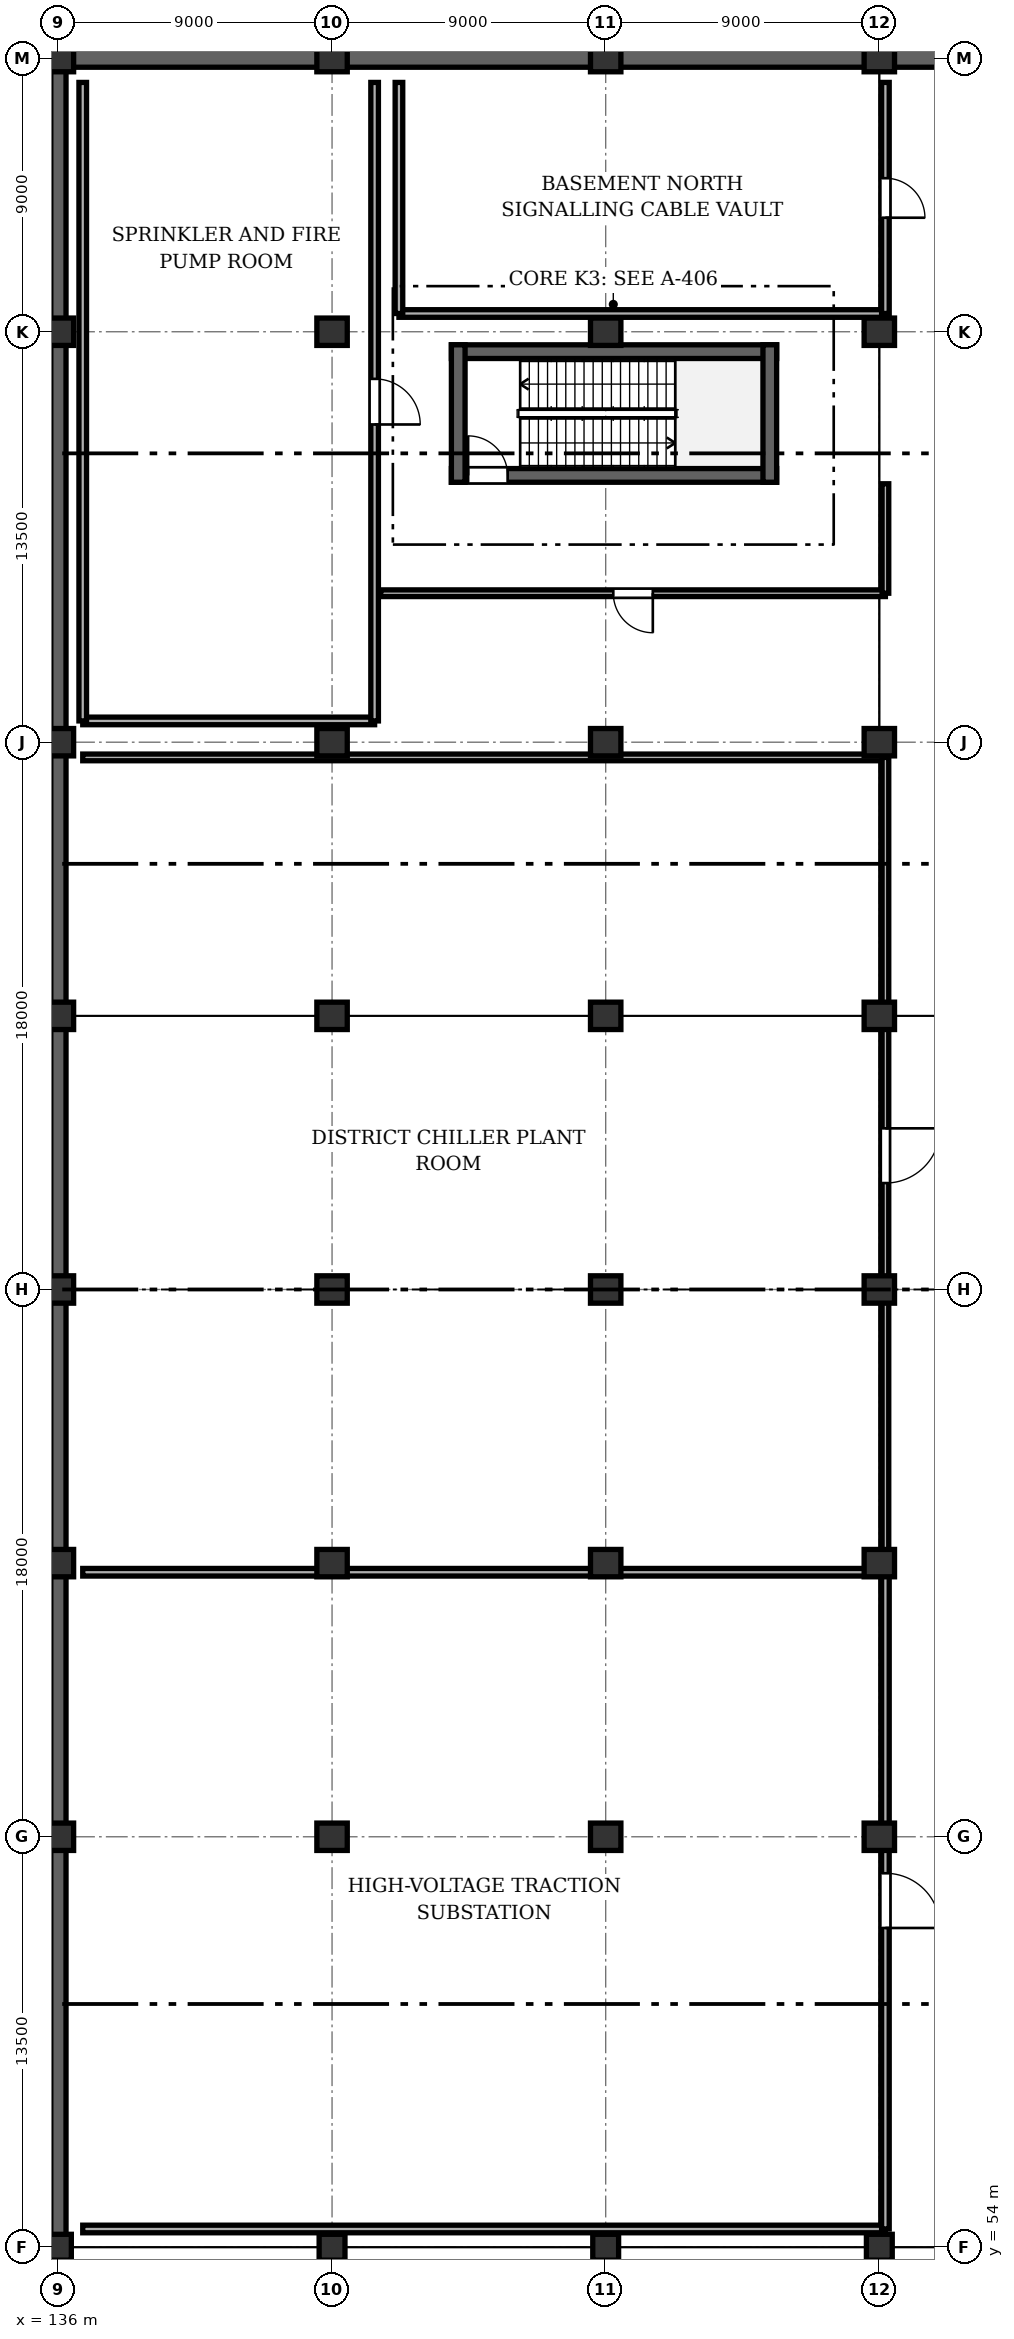
"""IFC4 building model, lengths in metres.
Left out: names, types, materials, properties, quantities, classifications, styles, units other than length and angle.
Written with IfcOpenShell. Run it as: python <this file> out.ifc"""

import sys

from ifc_helpers import new_model, si_unit, direction, frame, frame_2d, origin, origin_2d, place, context, subcontext, project, spatial, rectangle, extrude, element, fill, save


model = new_model("IFC4")
c1 = context("Model", 3, precision=1e-05, world=origin(), true_north=direction((0.0, 1.0)))
c2 = subcontext(c1, "Body", "Model", "MODEL_VIEW")
j1 = project(units=[si_unit("LENGTHUNIT", "METRE"), si_unit("PLANEANGLEUNIT", "RADIAN")], contexts=[c1])
p1 = place(None, origin())
s1 = spatial("IfcSite", under=j1, at=p1, CompositionType="ELEMENT")
p2 = place(p1, origin())
s2 = spatial("IfcBuilding", under=s1, at=p2, CompositionType="ELEMENT")
p3 = place(p2, frame((0.0, 0.0, -5.4)))
s3 = spatial("IfcBuildingStorey", under=s2, at=p3, CompositionType="ELEMENT", Elevation=-5.4)
p4 = place(p3, frame((136.0, 54.0, 0.0), z_axis=(0.0, 0.0, 1.0), x_axis=(1.0, 0.0, 0.0)))
e1 = element("IfcColumn", 1, at=p4, inside=s3, PredefinedType="COLUMN", context=c2, shape_type="SweptSolid", body=[
    extrude(rectangle(XDim=0.85, YDim=0.85, at=origin_2d()), origin(), (0.0, 0.0, 1.0), 5.4),
])
for number, where, z_axis, x_axis in (
    (2, (136.0, 67.5, 0.0), (0.0, 0.0, 1.0), (1.0, 0.0, 0.0)),
    (3, (136.0, 76.5, 0.0), (0.0, 0.0, 1.0), (1.0, 0.0, 0.0)),
    (4, (136.0, 85.5, 0.0), (0.0, 0.0, 1.0), (1.0, 0.0, 0.0)),
    (5, (136.0, 94.5, 0.0), (0.0, 0.0, 1.0), (1.0, 0.0, 0.0)),
    (6, (136.0, 103.5, 0.0), (0.0, 0.0, 1.0), (1.0, 0.0, 0.0)),
    (7, (136.0, 117.0, 0.0), (0.0, 0.0, 1.0), (1.0, 0.0, 0.0)),
    (8, (136.0, 126.0, 0.0), (0.0, 0.0, 1.0), (1.0, 0.0, 0.0)),
):
    element("IfcColumn", number, at=place(p3, frame(where, z_axis=z_axis, x_axis=x_axis)), inside=s3, PredefinedType="COLUMN", context=c2, shape_type="SweptSolid", body=[
        extrude(rectangle(XDim=1.0, YDim=0.9, at=origin_2d()), origin(), (0.0, 0.0, 1.0), 5.4),
    ])
p5 = place(p3, frame((145.0, 54.0, 0.0), z_axis=(0.0, 0.0, 1.0), x_axis=(1.0, 0.0, 0.0)))
e9 = element("IfcColumn", 9, at=p5, inside=s3, PredefinedType="COLUMN", context=c2, shape_type="SweptSolid", body=[
    extrude(rectangle(XDim=0.85, YDim=0.85, at=origin_2d()), origin(), (0.0, 0.0, 1.0), 5.4),
])
for number, where, z_axis, x_axis in (
    (10, (145.0, 67.5, 0.0), (0.0, 0.0, 1.0), (1.0, 0.0, 0.0)),
    (11, (145.0, 76.5, 0.0), (0.0, 0.0, 1.0), (1.0, 0.0, 0.0)),
    (12, (145.0, 85.5, 0.0), (0.0, 0.0, 1.0), (1.0, 0.0, 0.0)),
    (13, (145.0, 94.5, 0.0), (0.0, 0.0, 1.0), (1.0, 0.0, 0.0)),
    (14, (145.0, 103.5, 0.0), (0.0, 0.0, 1.0), (1.0, 0.0, 0.0)),
    (15, (145.0, 117.0, 0.0), (0.0, 0.0, 1.0), (1.0, 0.0, 0.0)),
    (16, (145.0, 126.0, 0.0), (0.0, 0.0, 1.0), (1.0, 0.0, 0.0)),
):
    element("IfcColumn", number, at=place(p3, frame(where, z_axis=z_axis, x_axis=x_axis)), inside=s3, PredefinedType="COLUMN", context=c2, shape_type="SweptSolid", body=[
        extrude(rectangle(XDim=1.0, YDim=0.9, at=origin_2d()), origin(), (0.0, 0.0, 1.0), 5.4),
    ])
p6 = place(p3, frame((154.0, 54.0, 0.0), z_axis=(0.0, 0.0, 1.0), x_axis=(1.0, 0.0, 0.0)))
e17 = element("IfcColumn", 17, at=p6, inside=s3, PredefinedType="COLUMN", context=c2, shape_type="SweptSolid", body=[
    extrude(rectangle(XDim=0.85, YDim=0.85, at=origin_2d()), origin(), (0.0, 0.0, 1.0), 5.4),
])
for number, where, z_axis, x_axis in (
    (18, (154.0, 67.5, 0.0), (0.0, 0.0, 1.0), (1.0, 0.0, 0.0)),
    (19, (154.0, 76.5, 0.0), (0.0, 0.0, 1.0), (1.0, 0.0, 0.0)),
    (20, (154.0, 85.5, 0.0), (0.0, 0.0, 1.0), (1.0, 0.0, 0.0)),
    (21, (154.0, 94.5, 0.0), (0.0, 0.0, 1.0), (1.0, 0.0, 0.0)),
    (22, (154.0, 103.5, 0.0), (0.0, 0.0, 1.0), (1.0, 0.0, 0.0)),
    (23, (154.0, 117.0, 0.0), (0.0, 0.0, 1.0), (1.0, 0.0, 0.0)),
    (24, (154.0, 126.0, 0.0), (0.0, 0.0, 1.0), (1.0, 0.0, 0.0)),
):
    element("IfcColumn", number, at=place(p3, frame(where, z_axis=z_axis, x_axis=x_axis)), inside=s3, PredefinedType="COLUMN", context=c2, shape_type="SweptSolid", body=[
        extrude(rectangle(XDim=1.0, YDim=0.9, at=origin_2d()), origin(), (0.0, 0.0, 1.0), 5.4),
    ])
p7 = place(p3, frame((163.0, 54.0, 0.0), z_axis=(0.0, 0.0, 1.0), x_axis=(1.0, 0.0, 0.0)))
e25 = element("IfcColumn", 25, at=p7, inside=s3, PredefinedType="COLUMN", context=c2, shape_type="SweptSolid", body=[
    extrude(rectangle(XDim=0.85, YDim=0.85, at=origin_2d()), origin(), (0.0, 0.0, 1.0), 5.4),
])
for number, where, z_axis, x_axis in (
    (26, (163.0, 67.5, 0.0), (0.0, 0.0, 1.0), (1.0, 0.0, 0.0)),
    (27, (163.0, 76.5, 0.0), (0.0, 0.0, 1.0), (1.0, 0.0, 0.0)),
    (28, (163.0, 85.5, 0.0), (0.0, 0.0, 1.0), (1.0, 0.0, 0.0)),
    (29, (163.0, 94.5, 0.0), (0.0, 0.0, 1.0), (1.0, 0.0, 0.0)),
    (30, (163.0, 103.5, 0.0), (0.0, 0.0, 1.0), (1.0, 0.0, 0.0)),
    (31, (163.0, 117.0, 0.0), (0.0, 0.0, 1.0), (1.0, 0.0, 0.0)),
    (32, (163.0, 126.0, 0.0), (0.0, 0.0, 1.0), (1.0, 0.0, 0.0)),
):
    element("IfcColumn", number, at=place(p3, frame(where, z_axis=z_axis, x_axis=x_axis)), inside=s3, PredefinedType="COLUMN", context=c2, shape_type="SweptSolid", body=[
        extrude(rectangle(XDim=1.0, YDim=0.9, at=origin_2d()), origin(), (0.0, 0.0, 1.0), 5.4),
    ])
p8 = place(p3, frame((188.0, 126.0, 0.0), z_axis=(0.0, 0.0, 1.0), x_axis=(-1.0, 0.0, 0.0)))
e33 = element("IfcWall", 33, at=p8, inside=s3, PredefinedType="USERDEFINED", context=c2, shape_type="SweptSolid", body=[
    extrude(rectangle(XDim=52.0, YDim=0.6, at=frame_2d((26.0, 0.0))), origin(), (0.0, 0.0, 1.0), 5.1),
])
p9 = place(p3, frame((136.0, 126.0, 0.0), z_axis=(0.0, 0.0, 1.0), x_axis=(0.0, -1.0, 0.0)))
e34 = element("IfcWall", 34, at=p9, inside=s3, PredefinedType="USERDEFINED", context=c2, shape_type="SweptSolid", body=[
    extrude(rectangle(XDim=72.0, YDim=0.5, at=frame_2d((36.0, 0.0))), origin(), (0.0, 0.0, 1.0), 5.1),
])
p10 = place(p3, frame((90.0, 54.0, 0.0), z_axis=(0.0, 0.0, 1.0), x_axis=(1.0, 0.0, 0.0)))
e35 = element("IfcWall", 35, at=p10, inside=s3, PredefinedType="USERDEFINED", context=c2, shape_type="SweptSolid", body=[
    extrude(rectangle(XDim=46.0, YDim=0.5, at=frame_2d((23.0, 0.0))), origin(), (0.0, 0.0, 1.0), 5.05),
])
p11 = place(p3, frame((148.925, 112.275, 0.0), z_axis=(0.0, 0.0, 1.0), x_axis=(1.0, 0.0, 0.0)))
e36 = element("IfcWall", 36, at=p11, inside=s3, PredefinedType="SHEAR", context=c2, shape_type="SweptSolid", body=[
    extrude(rectangle(XDim=10.698, YDim=0.45, at=frame_2d((5.349, 0.0))), origin(), (0.0, 0.0, 1.0), 5.1),
])
p12 = place(p11, frame((0.55, 0.0, 0.0)))
e37 = element("IfcOpeningElement", 37, at=p12, cuts=e36, PredefinedType="OPENING", context=c2, shape_type="SweptSolid", body=[
    extrude(rectangle(XDim=1.3, YDim=2.1, at=frame_2d((0.65, 1.05))), frame((0.0, 0.235, 0.0), z_axis=(0.0, -1.0, 0.0), x_axis=(1.0, 0.0, 0.0)), (0.0, 0.0, 1.0), 0.47),
])
p13 = place(p3, frame((159.623, 116.345, 0.0), z_axis=(0.0, 0.0, 1.0), x_axis=(-1.0, 0.0, 0.0)))
e38 = element("IfcWall", 38, at=p13, inside=s3, PredefinedType="SHEAR", context=c2, shape_type="SweptSolid", body=[
    extrude(rectangle(XDim=10.698, YDim=0.45, at=frame_2d((5.349, 0.0))), origin(), (0.0, 0.0, 1.0), 5.1),
])
for number, where, z_axis, x_axis in (
    (39, (159.397, 112.05, 0.0), (0.0, 0.0, 1.0), (0.0, 1.0, 0.0)),
    (40, (149.15, 116.57, 0.0), (0.0, 0.0, 1.0), (0.0, -1.0, 0.0)),
):
    element("IfcWall", number, at=place(p3, frame(where, z_axis=z_axis, x_axis=x_axis)), inside=s3, PredefinedType="SHEAR", context=c2, shape_type="SweptSolid", body=[
        extrude(rectangle(XDim=4.52, YDim=0.45, at=frame_2d((2.26, 0.0))), origin(), (0.0, 0.0, 1.0), 5.1),
    ])
for number, where, z_axis, x_axis in (
    (41, (163.2, 54.6, 0.0), (0.0, 0.0, 1.0), (-1.0, 0.0, 0.0)),
    (42, (136.8, 76.2, 0.0), (0.0, 0.0, 1.0), (1.0, 0.0, 0.0)),
):
    element("IfcWall", number, at=place(p3, frame(where, z_axis=z_axis, x_axis=x_axis)), inside=s3, PredefinedType="SOLIDWALL", context=c2, shape_type="SweptSolid", body=[
        extrude(rectangle(XDim=26.4, YDim=0.25, at=frame_2d((13.2, 0.0))), origin(), (0.0, 0.0, 1.0), 4.4),
    ])
p14 = place(p3, frame((163.2, 76.2, 0.0), z_axis=(0.0, 0.0, 1.0), x_axis=(0.0, -1.0, 0.0)))
e43 = element("IfcWall", 43, at=p14, inside=s3, PredefinedType="SOLIDWALL", context=c2, shape_type="SweptSolid", body=[
    extrude(rectangle(XDim=21.6, YDim=0.25, at=frame_2d((10.8, 0.0))), origin(), (0.0, 0.0, 1.0), 4.4),
])
p15 = place(p14, frame((9.9, 0.0, 0.0)))
e44 = element("IfcOpeningElement", 44, at=p15, cuts=e43, PredefinedType="OPENING", context=c2, shape_type="SweptSolid", body=[
    extrude(rectangle(XDim=1.8, YDim=2.2, at=frame_2d((0.9, 1.1))), frame((0.0, 0.135, 0.0), z_axis=(0.0, -1.0, 0.0), x_axis=(1.0, 0.0, 0.0)), (0.0, 0.0, 1.0), 0.27),
])
p16 = place(p3, frame((136.8, 103.0, 0.0), z_axis=(0.0, 0.0, 1.0), x_axis=(1.0, 0.0, 0.0)))
e45 = element("IfcWall", 45, at=p16, inside=s3, PredefinedType="SOLIDWALL", context=c2, shape_type="SweptSolid", body=[
    extrude(rectangle(XDim=26.4, YDim=0.22, at=frame_2d((13.2, 0.0))), origin(), (0.0, 0.0, 1.0), 4.4),
])
p17 = place(p3, frame((163.2, 103.0, 0.0), z_axis=(0.0, 0.0, 1.0), x_axis=(0.0, -1.0, 0.0)))
e46 = element("IfcWall", 46, at=p17, inside=s3, PredefinedType="SOLIDWALL", context=c2, shape_type="SweptSolid", body=[
    extrude(rectangle(XDim=26.2, YDim=0.22, at=frame_2d((13.1, 0.0))), origin(), (0.0, 0.0, 1.0), 4.4),
])
p18 = place(p17, frame((12.2, 0.0, 0.0)))
e47 = element("IfcOpeningElement", 47, at=p18, cuts=e46, PredefinedType="OPENING", context=c2, shape_type="SweptSolid", body=[
    extrude(rectangle(XDim=1.8, YDim=2.2, at=frame_2d((0.9, 1.1))), frame((0.0, 0.12, 0.0), z_axis=(0.0, -1.0, 0.0), x_axis=(1.0, 0.0, 0.0)), (0.0, 0.0, 1.0), 0.24),
])
p19 = place(p3, frame((146.4, 104.2, 0.0), z_axis=(0.0, 0.0, 1.0), x_axis=(-1.0, 0.0, 0.0)))
e48 = element("IfcWall", 48, at=p19, inside=s3, PredefinedType="SOLIDWALL", context=c2, shape_type="SweptSolid", body=[
    extrude(rectangle(XDim=9.6, YDim=0.25, at=frame_2d((4.8, 0.0))), origin(), (0.0, 0.0, 1.0), 4.4),
])
p20 = place(p3, frame((136.8, 104.2, 0.0), z_axis=(0.0, 0.0, 1.0), x_axis=(0.0, 1.0, 0.0)))
e49 = element("IfcWall", 49, at=p20, inside=s3, PredefinedType="SOLIDWALL", context=c2, shape_type="SweptSolid", body=[
    extrude(rectangle(XDim=21.0, YDim=0.25, at=frame_2d((10.5, 0.0))), origin(), (0.0, 0.0, 1.0), 4.4),
])
p21 = place(p3, frame((146.4, 125.2, 0.0), z_axis=(0.0, 0.0, 1.0), x_axis=(0.0, -1.0, 0.0)))
e50 = element("IfcWall", 50, at=p21, inside=s3, PredefinedType="SOLIDWALL", context=c2, shape_type="SweptSolid", body=[
    extrude(rectangle(XDim=21.0, YDim=0.25, at=frame_2d((10.5, 0.0))), origin(), (0.0, 0.0, 1.0), 4.4),
])
p22 = place(p21, frame((9.75, 0.0, 0.0)))
e51 = element("IfcOpeningElement", 51, at=p22, cuts=e50, PredefinedType="OPENING", context=c2, shape_type="SweptSolid", body=[
    extrude(rectangle(XDim=1.5, YDim=2.15, at=frame_2d((0.75, 1.075))), frame((0.0, 0.135, 0.0), z_axis=(0.0, -1.0, 0.0), x_axis=(1.0, 0.0, 0.0)), (0.0, 0.0, 1.0), 0.27),
])
p23 = place(p3, frame((163.2, 108.4, 0.0), z_axis=(0.0, 0.0, 1.0), x_axis=(-1.0, 0.0, 0.0)))
e52 = element("IfcWall", 52, at=p23, inside=s3, PredefinedType="SOLIDWALL", context=c2, shape_type="SweptSolid", body=[
    extrude(rectangle(XDim=16.6, YDim=0.22, at=frame_2d((8.3, 0.0))), origin(), (0.0, 0.0, 1.0), 4.4),
])
p24 = place(p23, frame((7.65, 0.0, 0.0)))
e53 = element("IfcOpeningElement", 53, at=p24, cuts=e52, PredefinedType="OPENING", context=c2, shape_type="SweptSolid", body=[
    extrude(rectangle(XDim=1.3, YDim=2.1, at=frame_2d((0.65, 1.05))), frame((0.0, 0.12, 0.0), z_axis=(0.0, -1.0, 0.0), x_axis=(1.0, 0.0, 0.0)), (0.0, 0.0, 1.0), 0.24),
])
p25 = place(p3, frame((163.2, 112.0, 0.0), z_axis=(0.0, 0.0, 1.0), x_axis=(0.0, -1.0, 0.0)))
e54 = element("IfcWall", 54, at=p25, inside=s3, PredefinedType="SOLIDWALL", context=c2, shape_type="SweptSolid", body=[
    extrude(rectangle(XDim=3.6, YDim=0.22, at=frame_2d((1.8, 0.0))), origin(), (0.0, 0.0, 1.0), 4.4),
])
p26 = place(p3, frame((163.2, 117.6, 0.0), z_axis=(0.0, 0.0, 1.0), x_axis=(-1.0, 0.0, 0.0)))
e55 = element("IfcWall", 55, at=p26, inside=s3, PredefinedType="SOLIDWALL", context=c2, shape_type="SweptSolid", body=[
    extrude(rectangle(XDim=16.0, YDim=0.25, at=frame_2d((8.0, 0.0))), origin(), (0.0, 0.0, 1.0), 4.4),
])
p27 = place(p3, frame((147.2, 117.6, 0.0), z_axis=(0.0, 0.0, 1.0), x_axis=(0.0, 1.0, 0.0)))
e56 = element("IfcWall", 56, at=p27, inside=s3, PredefinedType="SOLIDWALL", context=c2, shape_type="SweptSolid", body=[
    extrude(rectangle(XDim=7.6, YDim=0.25, at=frame_2d((3.8, 0.0))), origin(), (0.0, 0.0, 1.0), 4.4),
])
p28 = place(p3, frame((163.2, 125.2, 0.0), z_axis=(0.0, 0.0, 1.0), x_axis=(0.0, -1.0, 0.0)))
e57 = element("IfcWall", 57, at=p28, inside=s3, PredefinedType="SOLIDWALL", context=c2, shape_type="SweptSolid", body=[
    extrude(rectangle(XDim=7.6, YDim=0.25, at=frame_2d((3.8, 0.0))), origin(), (0.0, 0.0, 1.0), 4.4),
])
p29 = place(p28, frame((3.15, 0.0, 0.0)))
e58 = element("IfcOpeningElement", 58, at=p29, cuts=e57, PredefinedType="OPENING", context=c2, shape_type="SweptSolid", body=[
    extrude(rectangle(XDim=1.3, YDim=2.1, at=frame_2d((0.65, 1.05))), frame((0.0, 0.135, 0.0), z_axis=(0.0, -1.0, 0.0), x_axis=(1.0, 0.0, 0.0)), (0.0, 0.0, 1.0), 0.27),
])
p30 = place(p12, origin())
e59 = element("IfcDoor", 59, at=p30, inside=s3, OperationType="SINGLE_SWING_LEFT", PredefinedType="DOOR", context=c2, shape_type="SweptSolid", body=[
    extrude(rectangle(XDim=1.3, YDim=2.1, at=frame_2d((0.65, 1.05))), frame((0.0, 0.025, 0.0), z_axis=(0.0, -1.0, 0.0), x_axis=(1.0, 0.0, 0.0)), (0.0, 0.0, 1.0), 0.05),
])
fill(e37, e59)
p31 = place(p15, origin())
e60 = element("IfcDoor", 60, at=p31, inside=s3, OperationType="SINGLE_SWING_RIGHT", PredefinedType="DOOR", context=c2, shape_type="SweptSolid", body=[
    extrude(rectangle(XDim=1.8, YDim=2.2, at=frame_2d((0.9, 1.1))), frame((0.0, 0.025, 0.0), z_axis=(0.0, -1.0, 0.0), x_axis=(1.0, 0.0, 0.0)), (0.0, 0.0, 1.0), 0.05),
])
fill(e44, e60)
p32 = place(p18, origin())
e61 = element("IfcDoor", 61, at=p32, inside=s3, OperationType="SINGLE_SWING_LEFT", PredefinedType="DOOR", context=c2, shape_type="SweptSolid", body=[
    extrude(rectangle(XDim=1.8, YDim=2.2, at=frame_2d((0.9, 1.1))), frame((0.0, 0.025, 0.0), z_axis=(0.0, -1.0, 0.0), x_axis=(1.0, 0.0, 0.0)), (0.0, 0.0, 1.0), 0.05),
])
fill(e47, e61)
p33 = place(p22, origin())
e62 = element("IfcDoor", 62, at=p33, inside=s3, OperationType="SINGLE_SWING_RIGHT", PredefinedType="DOOR", context=c2, shape_type="SweptSolid", body=[
    extrude(rectangle(XDim=1.5, YDim=2.15, at=frame_2d((0.75, 1.075))), frame((0.0, 0.025, 0.0), z_axis=(0.0, -1.0, 0.0), x_axis=(1.0, 0.0, 0.0)), (0.0, 0.0, 1.0), 0.05),
])
fill(e51, e62)
p34 = place(p24, origin())
e63 = element("IfcDoor", 63, at=p34, inside=s3, OperationType="SINGLE_SWING_LEFT", PredefinedType="DOOR", context=c2, shape_type="SweptSolid", body=[
    extrude(rectangle(XDim=1.3, YDim=2.1, at=frame_2d((0.65, 1.05))), frame((0.0, 0.025, 0.0), z_axis=(0.0, -1.0, 0.0), x_axis=(1.0, 0.0, 0.0)), (0.0, 0.0, 1.0), 0.05),
])
fill(e53, e63)
p35 = place(p29, origin())
e64 = element("IfcDoor", 64, at=p35, inside=s3, OperationType="SINGLE_SWING_RIGHT", PredefinedType="DOOR", context=c2, shape_type="SweptSolid", body=[
    extrude(rectangle(XDim=1.3, YDim=2.1, at=frame_2d((0.65, 1.05))), frame((0.0, 0.025, 0.0), z_axis=(0.0, -1.0, 0.0), x_axis=(1.0, 0.0, 0.0)), (0.0, 0.0, 1.0), 0.05),
])
fill(e58, e64)
save(model, sys.argv[1])
